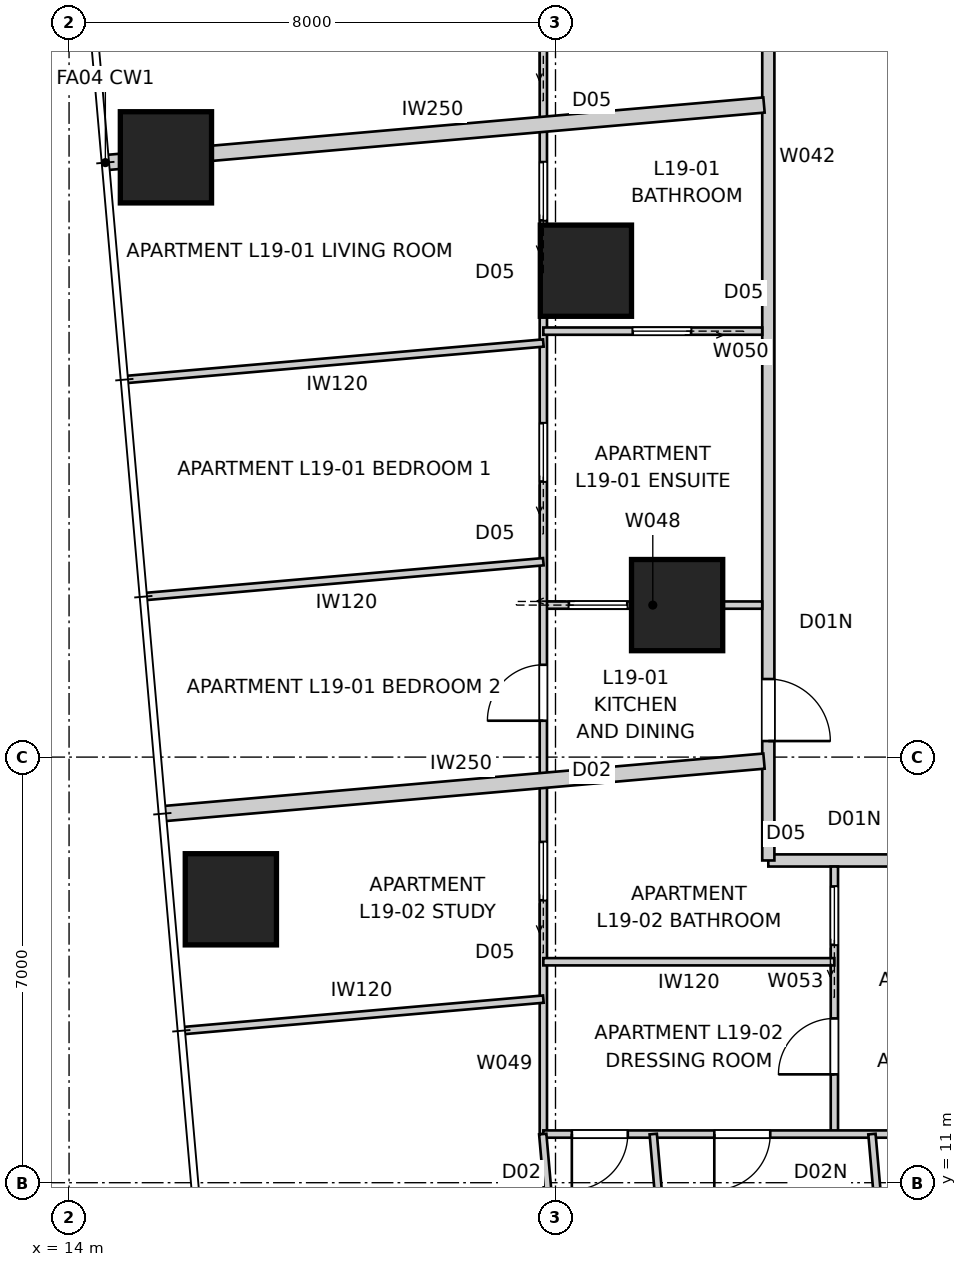
"""IFC4 building model, lengths in metres.
Left out: names, types, materials, properties, quantities, classifications, styles, units other than length and angle.
Written with IfcOpenShell. Run it as: python <this file> out.ifc"""

import sys

from ifc_helpers import new_model, si_unit, direction, frame, frame_2d, origin, origin_2d, place, context, subcontext, project, spatial, rectangle, extrude, element, fill, save


model = new_model("IFC4")
c1 = context("Model", 3, precision=1e-05, world=origin(), true_north=direction((0.0, 1.0)))
c2 = subcontext(c1, "Body", "Model", "MODEL_VIEW")
j1 = project(units=[si_unit("LENGTHUNIT", "METRE"), si_unit("PLANEANGLEUNIT", "RADIAN")], contexts=[c1])
p1 = place(None, origin())
s1 = spatial("IfcSite", under=j1, at=p1, CompositionType="ELEMENT")
p2 = place(p1, origin())
s2 = spatial("IfcBuilding", under=s1, at=p2, CompositionType="ELEMENT")
p3 = place(p2, frame((0.0, 0.0, 71.0)))
s3 = spatial("IfcBuildingStorey", under=s2, at=p3, CompositionType="ELEMENT", Elevation=71.0)
for number, where, z_axis, x_axis in (
    (1, (15.593, 27.865, 0.0), (0.0, 0.0, 1.0), (1.0, 0.0, 0.0)),
    (2, (16.661, 15.661, 0.0), (0.0, 0.0, 1.0), (1.0, 0.0, 0.0)),
):
    element("IfcColumn", number, at=place(p3, frame(where, z_axis=z_axis, x_axis=x_axis)), inside=s3, PredefinedType="COLUMN", context=c2, shape_type="SweptSolid", body=[
        extrude(rectangle(XDim=1.5, YDim=1.5, at=origin_2d()), origin(), (0.0, 0.0, 1.0), 3.2),
    ])
for number, where, z_axis, x_axis in (
    (3, (22.5, 26.0, 0.0), (0.0, 0.0, 1.0), (1.0, 0.0, 0.0)),
    (4, (24.0, 20.5, 0.0), (0.0, 0.0, 1.0), (1.0, 0.0, 0.0)),
):
    element("IfcColumn", number, at=place(p3, frame(where, z_axis=z_axis, x_axis=x_axis)), inside=s3, PredefinedType="COLUMN", context=c2, shape_type="SweptSolid", body=[
        extrude(rectangle(XDim=1.5, YDim=1.5, at=origin_2d()), origin(), (0.0, 0.0, 1.0), 3.4),
    ])
p4 = place(p3, frame((25.5, 16.3, 0.0), z_axis=(0.0, 0.0, 1.0), x_axis=(1.0, 0.0, 0.0)))
e5 = element("IfcWall", 5, at=p4, inside=s3, PredefinedType="PARTITIONING", context=c2, shape_type="SweptSolid", body=[
    extrude(rectangle(XDim=28.2, YDim=0.2, at=frame_2d((14.1, 0.0))), origin(), (0.0, 0.0, 1.0), 3.2),
])
p5 = place(p4, frame((19.784, 0.0, 0.0)))
e6 = element("IfcOpeningElement", 6, at=p5, cuts=e5, PredefinedType="OPENING", context=c2, shape_type="SweptSolid", body=[
    extrude(rectangle(XDim=1.02, YDim=2.34, at=frame_2d((0.51, 1.17))), frame((0.0, 0.11, 0.0), z_axis=(0.0, -1.0, 0.0), x_axis=(1.0, 0.0, 0.0)), (0.0, 0.0, 1.0), 0.22),
])
p6 = place(p4, frame((13.086, 0.0, 0.0)))
e7 = element("IfcOpeningElement", 7, at=p6, cuts=e5, PredefinedType="OPENING", context=c2, shape_type="SweptSolid", body=[
    extrude(rectangle(XDim=1.02, YDim=2.34, at=frame_2d((0.51, 1.17))), frame((0.0, 0.11, 0.0), z_axis=(0.0, -1.0, 0.0), x_axis=(1.0, 0.0, 0.0)), (0.0, 0.0, 1.0), 0.22),
])
p7 = place(p4, frame((2.333, 0.0, 0.0)))
e8 = element("IfcOpeningElement", 8, at=p7, cuts=e5, PredefinedType="OPENING", context=c2, shape_type="SweptSolid", body=[
    extrude(rectangle(XDim=1.02, YDim=2.0, at=frame_2d((0.51, 1.0))), frame((0.0, 0.11, 0.0), z_axis=(0.0, -1.0, 0.0), x_axis=(1.0, 0.0, 0.0)), (0.0, 0.0, 1.0), 0.22),
])
p8 = place(p3, frame((25.5, 44.5, 0.0), z_axis=(0.0, 0.0, 1.0), x_axis=(0.0, -1.0, 0.0)))
e9 = element("IfcWall", 9, at=p8, inside=s3, PredefinedType="PARTITIONING", context=c2, shape_type="SweptSolid", body=[
    extrude(rectangle(XDim=28.2, YDim=0.2, at=frame_2d((14.1, 0.0))), origin(), (0.0, 0.0, 1.0), 3.2),
])
p9 = place(p8, frame((7.019, 0.0, 0.0)))
e10 = element("IfcOpeningElement", 10, at=p9, cuts=e9, PredefinedType="OPENING", context=c2, shape_type="SweptSolid", body=[
    extrude(rectangle(XDim=1.02, YDim=2.34, at=frame_2d((0.51, 1.17))), frame((0.0, 0.11, 0.0), z_axis=(0.0, -1.0, 0.0), x_axis=(1.0, 0.0, 0.0)), (0.0, 0.0, 1.0), 0.22),
])
p10 = place(p8, frame((2.15, 0.0, 0.0)))
e11 = element("IfcOpeningElement", 11, at=p10, cuts=e9, PredefinedType="OPENING", context=c2, shape_type="SweptSolid", body=[
    extrude(rectangle(XDim=1.02, YDim=2.0, at=frame_2d((0.51, 1.0))), frame((0.0, 0.11, 0.0), z_axis=(0.0, -1.0, 0.0), x_axis=(1.0, 0.0, 0.0)), (0.0, 0.0, 1.0), 0.22),
])
p11 = place(p8, frame((25.216, 0.0, 0.0)))
e12 = element("IfcOpeningElement", 12, at=p11, cuts=e9, PredefinedType="OPENING", context=c2, shape_type="SweptSolid", body=[
    extrude(rectangle(XDim=1.02, YDim=2.0, at=frame_2d((0.51, 1.0))), frame((0.0, 0.11, 0.0), z_axis=(0.0, -1.0, 0.0), x_axis=(1.0, 0.0, 0.0)), (0.0, 0.0, 1.0), 0.22),
])
p12 = place(p3, frame((15.534, 17.068, 0.0), z_axis=(0.0, 0.0, 1.0), x_axis=(0.996194517831, 0.087157803114, 0.0)))
e13 = element("IfcWall", 13, at=p12, inside=s3, PredefinedType="PARTITIONING", context=c2, shape_type="SweptSolid", body=[
    extrude(rectangle(XDim=9.933, YDim=0.25, at=frame_2d((4.966, 0.0))), origin(), (0.0, 0.0, 1.0), 3.2),
])
p13 = place(p3, frame((14.597, 27.778, 0.0), z_axis=(0.0, 0.0, 1.0), x_axis=(0.996196056792, 0.087140211333, 0.0)))
e14 = element("IfcWall", 14, at=p13, inside=s3, PredefinedType="PARTITIONING", context=c2, shape_type="SweptSolid", body=[
    extrude(rectangle(XDim=10.873, YDim=0.25, at=frame_2d((5.437, 0.0))), origin(), (0.0, 0.0, 1.0), 3.2),
])
p14 = place(p3, frame((21.8, 20.5, 0.0), z_axis=(0.0, 0.0, 1.0), x_axis=(1.0, 0.0, 0.0)))
e15 = element("IfcWall", 15, at=p14, inside=s3, PredefinedType="PARTITIONING", context=c2, shape_type="SweptSolid", body=[
    extrude(rectangle(XDim=3.6, YDim=0.12, at=frame_2d((1.8, 0.0))), origin(), (0.0, 0.0, 1.0), 3.2),
])
p15 = place(p14, frame((0.42, 0.0, 0.0)))
e16 = element("IfcOpeningElement", 16, at=p15, cuts=e15, PredefinedType="OPENING", context=c2, shape_type="SweptSolid", body=[
    extrude(rectangle(XDim=0.96, YDim=2.1, at=frame_2d((0.48, 1.05))), frame((0.0, 0.07, 0.0), z_axis=(0.0, -1.0, 0.0), x_axis=(1.0, 0.0, 0.0)), (0.0, 0.0, 1.0), 0.14),
])
p16 = place(p3, frame((21.8, 11.8, 0.0), z_axis=(0.0, 0.0, 1.0), x_axis=(0.0, 1.0, 0.0)))
e17 = element("IfcWall", 17, at=p16, inside=s3, PredefinedType="PARTITIONING", context=c2, shape_type="SweptSolid", body=[
    extrude(rectangle(XDim=20.065, YDim=0.12, at=frame_2d((10.032, 0.0))), origin(), (0.0, 0.0, 1.0), 3.2),
])
p17 = place(p16, frame((6.798, 0.0, 0.0)))
e18 = element("IfcOpeningElement", 18, at=p17, cuts=e17, PredefinedType="OPENING", context=c2, shape_type="SweptSolid", body=[
    extrude(rectangle(XDim=0.92, YDim=2.34, at=frame_2d((0.46, 1.17))), frame((0.0, 0.07, 0.0), z_axis=(0.0, -1.0, 0.0), x_axis=(1.0, 0.0, 0.0)), (0.0, 0.0, 1.0), 0.14),
])
p18 = place(p16, frame((3.845, 0.0, 0.0)))
e19 = element("IfcOpeningElement", 19, at=p18, cuts=e17, PredefinedType="OPENING", context=c2, shape_type="SweptSolid", body=[
    extrude(rectangle(XDim=0.96, YDim=2.1, at=frame_2d((0.48, 1.05))), frame((0.0, 0.07, 0.0), z_axis=(0.0, -1.0, 0.0), x_axis=(1.0, 0.0, 0.0)), (0.0, 0.0, 1.0), 0.14),
])
p19 = place(p16, frame((10.732, 0.0, 0.0)))
e20 = element("IfcOpeningElement", 20, at=p19, cuts=e17, PredefinedType="OPENING", context=c2, shape_type="SweptSolid", body=[
    extrude(rectangle(XDim=0.96, YDim=2.1, at=frame_2d((0.48, 1.05))), frame((0.0, 0.07, 0.0), z_axis=(0.0, -1.0, 0.0), x_axis=(1.0, 0.0, 0.0)), (0.0, 0.0, 1.0), 0.14),
])
p20 = place(p16, frame((17.856, 0.0, 0.0)))
e21 = element("IfcOpeningElement", 21, at=p20, cuts=e17, PredefinedType="OPENING", context=c2, shape_type="SweptSolid", body=[
    extrude(rectangle(XDim=0.96, YDim=2.1, at=frame_2d((0.48, 1.05))), frame((0.0, 0.07, 0.0), z_axis=(0.0, -1.0, 0.0), x_axis=(1.0, 0.0, 0.0)), (0.0, 0.0, 1.0), 0.14),
])
p21 = place(p16, frame((15.027, 0.0, 0.0)))
e22 = element("IfcOpeningElement", 22, at=p21, cuts=e17, PredefinedType="OPENING", context=c2, shape_type="SweptSolid", body=[
    extrude(rectangle(XDim=0.96, YDim=2.1, at=frame_2d((0.48, 1.05))), frame((0.0, 0.07, 0.0), z_axis=(0.0, -1.0, 0.0), x_axis=(1.0, 0.0, 0.0)), (0.0, 0.0, 1.0), 0.14),
])
p22 = place(p3, frame((25.4, 25.006, 0.0), z_axis=(0.0, 0.0, 1.0), x_axis=(-1.0, 0.0, 0.0)))
e23 = element("IfcWall", 23, at=p22, inside=s3, PredefinedType="PARTITIONING", context=c2, shape_type="SweptSolid", body=[
    extrude(rectangle(XDim=3.6, YDim=0.12, at=frame_2d((1.8, 0.0))), origin(), (0.0, 0.0, 1.0), 3.2),
])
p23 = place(p22, frame((1.17, 0.0, 0.0)))
e24 = element("IfcOpeningElement", 24, at=p23, cuts=e23, PredefinedType="OPENING", context=c2, shape_type="SweptSolid", body=[
    extrude(rectangle(XDim=0.96, YDim=2.1, at=frame_2d((0.48, 1.05))), frame((0.0, 0.07, 0.0), z_axis=(0.0, -1.0, 0.0), x_axis=(1.0, 0.0, 0.0)), (0.0, 0.0, 1.0), 0.14),
])
p24 = place(p3, frame((21.8, 24.811, 0.0), z_axis=(0.0, 0.0, 1.0), x_axis=(-0.996191674914, -0.087190290923, 0.0)))
e25 = element("IfcWall", 25, at=p24, inside=s3, PredefinedType="PARTITIONING", context=c2, shape_type="SweptSolid", body=[
    extrude(rectangle(XDim=6.877, YDim=0.12, at=frame_2d((3.438, 0.0))), origin(), (0.0, 0.0, 1.0), 3.2),
])
p25 = place(p3, frame((21.8, 21.214, 0.0), z_axis=(0.0, 0.0, 1.0), x_axis=(-0.996195090105, -0.087151261897, 0.0)))
e26 = element("IfcWall", 26, at=p25, inside=s3, PredefinedType="PARTITIONING", context=c2, shape_type="SweptSolid", body=[
    extrude(rectangle(XDim=6.563, YDim=0.12, at=frame_2d((3.282, 0.0))), origin(), (0.0, 0.0, 1.0), 3.2),
])
p26 = place(p3, frame((26.586, 11.8, 0.0), z_axis=(0.0, 0.0, 1.0), x_axis=(0.0, 1.0, 0.0)))
e27 = element("IfcWall", 27, at=p26, inside=s3, PredefinedType="PARTITIONING", context=c2, shape_type="SweptSolid", body=[
    extrude(rectangle(XDim=4.4, YDim=0.12, at=frame_2d((2.2, 0.0))), origin(), (0.0, 0.0, 1.0), 3.2),
])
p27 = place(p26, frame((0.982, 0.0, 0.0)))
e28 = element("IfcOpeningElement", 28, at=p27, cuts=e27, PredefinedType="OPENING", context=c2, shape_type="SweptSolid", body=[
    extrude(rectangle(XDim=0.92, YDim=2.0, at=frame_2d((0.46, 1.0))), frame((0.0, 0.07, 0.0), z_axis=(0.0, -1.0, 0.0), x_axis=(1.0, 0.0, 0.0)), (0.0, 0.0, 1.0), 0.14),
])
p28 = place(p26, frame((3.112, 0.0, 0.0)))
e29 = element("IfcOpeningElement", 29, at=p28, cuts=e27, PredefinedType="OPENING", context=c2, shape_type="SweptSolid", body=[
    extrude(rectangle(XDim=0.96, YDim=2.1, at=frame_2d((0.48, 1.05))), frame((0.0, 0.07, 0.0), z_axis=(0.0, -1.0, 0.0), x_axis=(1.0, 0.0, 0.0)), (0.0, 0.0, 1.0), 0.14),
])
p29 = place(p3, frame((58.2, 11.8, 0.0), z_axis=(0.0, 0.0, 1.0), x_axis=(-1.0, 0.0, 0.0)))
e30 = element("IfcWall", 30, at=p29, inside=s3, PredefinedType="PARTITIONING", context=c2, shape_type="SweptSolid", body=[
    extrude(rectangle(XDim=36.4, YDim=0.12, at=frame_2d((18.2, 0.0))), origin(), (0.0, 0.0, 1.0), 3.2),
])
p30 = place(p29, frame((11.12, 0.0, 0.0)))
e31 = element("IfcOpeningElement", 31, at=p30, cuts=e30, PredefinedType="OPENING", context=c2, shape_type="SweptSolid", body=[
    extrude(rectangle(XDim=0.92, YDim=2.34, at=frame_2d((0.46, 1.17))), frame((0.0, 0.07, 0.0), z_axis=(0.0, -1.0, 0.0), x_axis=(1.0, 0.0, 0.0)), (0.0, 0.0, 1.0), 0.14),
])
p31 = place(p29, frame((17.971, 0.0, 0.0)))
e32 = element("IfcOpeningElement", 32, at=p31, cuts=e30, PredefinedType="OPENING", context=c2, shape_type="SweptSolid", body=[
    extrude(rectangle(XDim=0.92, YDim=2.34, at=frame_2d((0.46, 1.17))), frame((0.0, 0.07, 0.0), z_axis=(0.0, -1.0, 0.0), x_axis=(1.0, 0.0, 0.0)), (0.0, 0.0, 1.0), 0.14),
])
p32 = place(p29, frame((28.877, 0.0, 0.0)))
e33 = element("IfcOpeningElement", 33, at=p32, cuts=e30, PredefinedType="OPENING", context=c2, shape_type="SweptSolid", body=[
    extrude(rectangle(XDim=0.92, YDim=2.34, at=frame_2d((0.46, 1.17))), frame((0.0, 0.07, 0.0), z_axis=(0.0, -1.0, 0.0), x_axis=(1.0, 0.0, 0.0)), (0.0, 0.0, 1.0), 0.14),
])
p33 = place(p29, frame((7.16, 0.0, 0.0)))
e34 = element("IfcOpeningElement", 34, at=p33, cuts=e30, PredefinedType="OPENING", context=c2, shape_type="SweptSolid", body=[
    extrude(rectangle(XDim=0.96, YDim=2.1, at=frame_2d((0.48, 1.05))), frame((0.0, 0.07, 0.0), z_axis=(0.0, -1.0, 0.0), x_axis=(1.0, 0.0, 0.0)), (0.0, 0.0, 1.0), 0.14),
])
p34 = place(p29, frame((15.181, 0.0, 0.0)))
e35 = element("IfcOpeningElement", 35, at=p34, cuts=e30, PredefinedType="OPENING", context=c2, shape_type="SweptSolid", body=[
    extrude(rectangle(XDim=0.96, YDim=2.1, at=frame_2d((0.48, 1.05))), frame((0.0, 0.07, 0.0), z_axis=(0.0, -1.0, 0.0), x_axis=(1.0, 0.0, 0.0)), (0.0, 0.0, 1.0), 0.14),
])
p35 = place(p29, frame((32.668, 0.0, 0.0)))
e36 = element("IfcOpeningElement", 36, at=p35, cuts=e30, PredefinedType="OPENING", context=c2, shape_type="SweptSolid", body=[
    extrude(rectangle(XDim=0.92, YDim=2.0, at=frame_2d((0.46, 1.0))), frame((0.0, 0.07, 0.0), z_axis=(0.0, -1.0, 0.0), x_axis=(1.0, 0.0, 0.0)), (0.0, 0.0, 1.0), 0.14),
])
p36 = place(p29, frame((35.011, 0.0, 0.0)))
e37 = element("IfcOpeningElement", 37, at=p36, cuts=e30, PredefinedType="OPENING", context=c2, shape_type="SweptSolid", body=[
    extrude(rectangle(XDim=0.92, YDim=2.34, at=frame_2d((0.46, 1.17))), frame((0.0, 0.07, 0.0), z_axis=(0.0, -1.0, 0.0), x_axis=(1.0, 0.0, 0.0)), (0.0, 0.0, 1.0), 0.14),
])
p37 = place(p29, frame((0.675, 0.0, 0.0)))
e38 = element("IfcOpeningElement", 38, at=p37, cuts=e30, PredefinedType="OPENING", context=c2, shape_type="SweptSolid", body=[
    extrude(rectangle(XDim=0.92, YDim=2.34, at=frame_2d((0.46, 1.17))), frame((0.0, 0.07, 0.0), z_axis=(0.0, -1.0, 0.0), x_axis=(1.0, 0.0, 0.0)), (0.0, 0.0, 1.0), 0.14),
])
p38 = place(p29, frame((25.11, 0.0, 0.0)))
e39 = element("IfcOpeningElement", 39, at=p38, cuts=e30, PredefinedType="OPENING", context=c2, shape_type="SweptSolid", body=[
    extrude(rectangle(XDim=0.96, YDim=2.1, at=frame_2d((0.48, 1.05))), frame((0.0, 0.07, 0.0), z_axis=(0.0, -1.0, 0.0), x_axis=(1.0, 0.0, 0.0)), (0.0, 0.0, 1.0), 0.14),
])
p39 = place(p29, frame((3.904, 0.0, 0.0)))
e40 = element("IfcOpeningElement", 40, at=p39, cuts=e30, PredefinedType="OPENING", context=c2, shape_type="SweptSolid", body=[
    extrude(rectangle(XDim=0.96, YDim=2.1, at=frame_2d((0.48, 1.05))), frame((0.0, 0.07, 0.0), z_axis=(0.0, -1.0, 0.0), x_axis=(1.0, 0.0, 0.0)), (0.0, 0.0, 1.0), 0.14),
])
p40 = place(p3, frame((26.586, 14.634, 0.0), z_axis=(0.0, 0.0, 1.0), x_axis=(-1.0, 0.0, 0.0)))
e41 = element("IfcWall", 41, at=p40, inside=s3, PredefinedType="PARTITIONING", context=c2, shape_type="SweptSolid", body=[
    extrude(rectangle(XDim=4.786, YDim=0.12, at=frame_2d((2.393, 0.0))), origin(), (0.0, 0.0, 1.0), 2.399),
])
p41 = place(p3, frame((15.886, 13.502, 0.0), z_axis=(0.0, 0.0, 1.0), x_axis=(0.996195547509, 0.087146033323, 0.0)))
e42 = element("IfcWall", 42, at=p41, inside=s3, PredefinedType="PARTITIONING", context=c2, shape_type="SweptSolid", body=[
    extrude(rectangle(XDim=5.937, YDim=0.12, at=frame_2d((2.968, 0.0))), origin(), (0.0, 0.0, 1.0), 2.399),
])
p42 = place(p3, frame((21.79, 11.8, 0.0), z_axis=(0.0, 0.0, 1.0), x_axis=(0.087153024244, -0.996194935926, 0.0)))
e43 = element("IfcWall", 43, at=p42, inside=s3, PredefinedType="PARTITIONING", context=c2, shape_type="SweptSolid", body=[
    extrude(rectangle(XDim=8.917, YDim=0.12, at=frame_2d((4.458, 0.0))), origin(), (0.0, 0.0, 1.0), 3.2),
])
p43 = place(p42, frame((2.913, 0.0, 0.0)))
e44 = element("IfcOpeningElement", 44, at=p43, cuts=e43, PredefinedType="OPENING", context=c2, shape_type="SweptSolid", body=[
    extrude(rectangle(XDim=0.92, YDim=2.0, at=frame_2d((0.46, 1.0))), frame((0.0, 0.07, 0.0), z_axis=(0.0, -1.0, 0.0), x_axis=(1.0, 0.0, 0.0)), (0.0, 0.0, 1.0), 0.14),
])
p44 = place(p3, frame((27.204, 11.8, 0.0), z_axis=(0.0, 0.0, 1.0), x_axis=(0.087167308925, -0.996193686115, 0.0)))
e45 = element("IfcWall", 45, at=p44, inside=s3, PredefinedType="PARTITIONING", context=c2, shape_type="SweptSolid", body=[
    extrude(rectangle(XDim=8.445, YDim=0.12, at=frame_2d((4.222, 0.0))), origin(), (0.0, 0.0, 1.0), 2.399),
])
p45 = place(p3, frame((24.371, 3.075, 0.0), z_axis=(0.0, 0.0, 1.0), x_axis=(-0.087169716747, 0.996193475426, 0.0)))
e46 = element("IfcWall", 46, at=p45, inside=s3, PredefinedType="PARTITIONING", context=c2, shape_type="SweptSolid", body=[
    extrude(rectangle(XDim=8.758, YDim=0.12, at=frame_2d((4.379, 0.0))), origin(), (0.0, 0.0, 1.0), 3.2),
])
p46 = place(p11, origin())
e47 = element("IfcDoor", 47, at=p46, inside=s3, OperationType="SINGLE_SWING_RIGHT", PredefinedType="DOOR", context=c2, shape_type="SweptSolid", body=[
    extrude(rectangle(XDim=1.02, YDim=2.0, at=frame_2d((0.51, 1.0))), frame((0.0, 0.025, 0.0), z_axis=(0.0, -1.0, 0.0), x_axis=(1.0, 0.0, 0.0)), (0.0, 0.0, 1.0), 0.05),
])
fill(e12, e47)
p47 = place(p27, origin())
e48 = element("IfcDoor", 48, at=p47, inside=s3, OperationType="SINGLE_SWING_LEFT", PredefinedType="DOOR", context=c2, shape_type="SweptSolid", body=[
    extrude(rectangle(XDim=0.92, YDim=2.0, at=frame_2d((0.46, 1.0))), frame((0.0, 0.025, 0.0), z_axis=(0.0, -1.0, 0.0), x_axis=(1.0, 0.0, 0.0)), (0.0, 0.0, 1.0), 0.05),
])
fill(e28, e48)
p48 = place(p28, origin())
e49 = element("IfcDoor", 49, at=p48, inside=s3, OperationType="SLIDING_TO_LEFT", PredefinedType="DOOR", context=c2, shape_type="SweptSolid", body=[
    extrude(rectangle(XDim=0.96, YDim=2.1, at=frame_2d((0.48, 1.05))), frame((0.0, 0.025, 0.0), z_axis=(0.0, -1.0, 0.0), x_axis=(1.0, 0.0, 0.0)), (0.0, 0.0, 1.0), 0.05),
])
fill(e29, e49)
p49 = place(p15, origin())
e50 = element("IfcDoor", 50, at=p49, inside=s3, OperationType="SLIDING_TO_LEFT", PredefinedType="DOOR", context=c2, shape_type="SweptSolid", body=[
    extrude(rectangle(XDim=0.96, YDim=2.1, at=frame_2d((0.48, 1.05))), frame((0.0, 0.025, 0.0), z_axis=(0.0, -1.0, 0.0), x_axis=(1.0, 0.0, 0.0)), (0.0, 0.0, 1.0), 0.05),
])
fill(e16, e50)
p50 = place(p17, origin())
e51 = element("IfcDoor", 51, at=p50, inside=s3, OperationType="SINGLE_SWING_LEFT", PredefinedType="DOOR", context=c2, shape_type="SweptSolid", body=[
    extrude(rectangle(XDim=0.92, YDim=2.34, at=frame_2d((0.46, 1.17))), frame((0.0, 0.025, 0.0), z_axis=(0.0, -1.0, 0.0), x_axis=(1.0, 0.0, 0.0)), (0.0, 0.0, 1.0), 0.05),
])
fill(e18, e51)
p51 = place(p35, origin())
e52 = element("IfcDoor", 52, at=p51, inside=s3, OperationType="SINGLE_SWING_RIGHT", PredefinedType="DOOR", context=c2, shape_type="SweptSolid", body=[
    extrude(rectangle(XDim=0.92, YDim=2.0, at=frame_2d((0.46, 1.0))), frame((0.0, 0.025, 0.0), z_axis=(0.0, -1.0, 0.0), x_axis=(1.0, 0.0, 0.0)), (0.0, 0.0, 1.0), 0.05),
])
fill(e36, e52)
p52 = place(p36, origin())
e53 = element("IfcDoor", 53, at=p52, inside=s3, OperationType="SINGLE_SWING_RIGHT", PredefinedType="DOOR", context=c2, shape_type="SweptSolid", body=[
    extrude(rectangle(XDim=0.92, YDim=2.34, at=frame_2d((0.46, 1.17))), frame((0.0, 0.025, 0.0), z_axis=(0.0, -1.0, 0.0), x_axis=(1.0, 0.0, 0.0)), (0.0, 0.0, 1.0), 0.05),
])
fill(e37, e53)
p53 = place(p18, origin())
e54 = element("IfcDoor", 54, at=p53, inside=s3, OperationType="SLIDING_TO_LEFT", PredefinedType="DOOR", context=c2, shape_type="SweptSolid", body=[
    extrude(rectangle(XDim=0.96, YDim=2.1, at=frame_2d((0.48, 1.05))), frame((0.0, 0.025, 0.0), z_axis=(0.0, -1.0, 0.0), x_axis=(1.0, 0.0, 0.0)), (0.0, 0.0, 1.0), 0.05),
])
fill(e19, e54)
p54 = place(p19, origin())
e55 = element("IfcDoor", 55, at=p54, inside=s3, OperationType="SLIDING_TO_LEFT", PredefinedType="DOOR", context=c2, shape_type="SweptSolid", body=[
    extrude(rectangle(XDim=0.96, YDim=2.1, at=frame_2d((0.48, 1.05))), frame((0.0, 0.025, 0.0), z_axis=(0.0, -1.0, 0.0), x_axis=(1.0, 0.0, 0.0)), (0.0, 0.0, 1.0), 0.05),
])
fill(e20, e55)
p55 = place(p23, origin())
e56 = element("IfcDoor", 56, at=p55, inside=s3, OperationType="SLIDING_TO_LEFT", PredefinedType="DOOR", context=c2, shape_type="SweptSolid", body=[
    extrude(rectangle(XDim=0.96, YDim=2.1, at=frame_2d((0.48, 1.05))), frame((0.0, 0.025, 0.0), z_axis=(0.0, -1.0, 0.0), x_axis=(1.0, 0.0, 0.0)), (0.0, 0.0, 1.0), 0.05),
])
fill(e24, e56)
p56 = place(p21, origin())
e57 = element("IfcDoor", 57, at=p56, inside=s3, OperationType="SLIDING_TO_LEFT", PredefinedType="DOOR", context=c2, shape_type="SweptSolid", body=[
    extrude(rectangle(XDim=0.96, YDim=2.1, at=frame_2d((0.48, 1.05))), frame((0.0, 0.025, 0.0), z_axis=(0.0, -1.0, 0.0), x_axis=(1.0, 0.0, 0.0)), (0.0, 0.0, 1.0), 0.05),
])
fill(e22, e57)
save(model, sys.argv[1])
